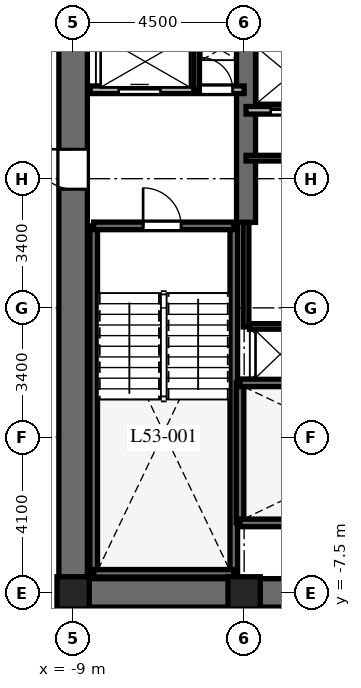
"""IFC4 building model, lengths in metres.
Left out: names, types, materials, properties, quantities, classifications, styles, units other than length and angle.
Written with IfcOpenShell. Run it as: python <this file> out.ifc"""

import sys

from ifc_helpers import new_model, si_unit, direction, frame, frame_2d, origin, origin_2d, place, context, subcontext, project, spatial, rectangle, extrude, element, fill, save


model = new_model("IFC4")
c1 = context("Model", 3, precision=1e-05, world=origin(), true_north=direction((0.0, 1.0)))
c2 = subcontext(c1, "Body", "Model", "MODEL_VIEW")
j1 = project(units=[si_unit("LENGTHUNIT", "METRE"), si_unit("PLANEANGLEUNIT", "RADIAN")], contexts=[c1])
p1 = place(None, origin())
s1 = spatial("IfcSite", under=j1, at=p1, CompositionType="ELEMENT")
p2 = place(p1, origin())
s2 = spatial("IfcBuilding", under=s1, at=p2, CompositionType="ELEMENT")
p3 = place(p2, frame((0.0, 0.0, 214.1)))
s3 = spatial("IfcBuildingStorey", under=s2, at=p3, CompositionType="ELEMENT", Elevation=214.1)
p4 = place(p3, frame((-9.375, -7.5, 0.0), z_axis=(0.0, 0.0, 1.0), x_axis=(1.0, 0.0, 0.0)))
e1 = element("IfcWall", 1, at=p4, inside=s3, PredefinedType="SHEAR", context=c2, shape_type="SweptSolid", body=[
    extrude(rectangle(XDim=18.75, YDim=0.75, at=frame_2d((9.375, 0.0))), origin(), (0.0, 0.0, 1.0), 3.8),
])
p5 = place(p4, frame((9.425, 0.0, 0.0)))
e2 = element("IfcOpeningElement", 2, at=p5, cuts=e1, PredefinedType="OPENING", context=c2, shape_type="SweptSolid", body=[
    extrude(rectangle(XDim=1.0, YDim=2.15, at=frame_2d((0.5, 1.075))), frame((0.0, 0.385, 0.0), z_axis=(0.0, -1.0, 0.0), x_axis=(1.0, 0.0, 0.0)), (0.0, 0.0, 1.0), 0.77),
])
p6 = place(p3, frame((-9.0, -7.125, 0.0), z_axis=(0.0, 0.0, 1.0), x_axis=(0.0, 1.0, 0.0)))
e3 = element("IfcWall", 3, at=p6, inside=s3, PredefinedType="SHEAR", context=c2, shape_type="SweptSolid", body=[
    extrude(rectangle(XDim=14.25, YDim=0.75, at=frame_2d((7.125, 0.0))), origin(), (0.0, 0.0, 1.0), 3.8),
])
p7 = place(p6, frame((10.25, 0.0, 0.0)))
e4 = element("IfcOpeningElement", 4, at=p7, cuts=e3, PredefinedType="OPENING", context=c2, shape_type="SweptSolid", body=[
    extrude(rectangle(XDim=1.05, YDim=2.15, at=frame_2d((0.525, 1.075))), frame((0.0, 0.385, 0.0), z_axis=(0.0, -1.0, 0.0), x_axis=(1.0, 0.0, 0.0)), (0.0, 0.0, 1.0), 0.77),
])
p8 = place(p3, frame((-4.45, 2.25, 0.0), z_axis=(0.0, 0.0, 1.0), x_axis=(0.0, 1.0, 0.0)))
e5 = element("IfcWall", 5, at=p8, inside=s3, PredefinedType="SHEAR", context=c2, shape_type="SweptSolid", body=[
    extrude(rectangle(XDim=4.875, YDim=0.5, at=frame_2d((2.438, 0.0))), origin(), (0.0, 0.0, 1.0), 3.8),
])
for number, where, z_axis, x_axis in (
    (6, (-8.458, -6.985, 0.0), (0.0, 0.0, 1.0), (0.0, 1.0, 0.0)),
    (7, (-4.772, -6.985, 0.0), (0.0, 0.0, 1.0), (0.0, 1.0, 0.0)),
):
    element("IfcWall", number, at=place(p3, frame(where, z_axis=z_axis, x_axis=x_axis)), inside=s3, PredefinedType="SHEAR", context=c2, shape_type="SweptSolid", body=[
        extrude(rectangle(XDim=9.143, YDim=0.2, at=frame_2d((4.572, 0.0))), origin(), (0.0, 0.0, 1.0), 3.8),
    ])
p9 = place(p3, frame((-8.458, -6.985, 0.0), z_axis=(0.0, 0.0, 1.0), x_axis=(1.0, 0.0, 0.0)))
e8 = element("IfcWall", 8, at=p9, inside=s3, PredefinedType="SHEAR", context=c2, shape_type="SweptSolid", body=[
    extrude(rectangle(XDim=3.686, YDim=0.2, at=frame_2d((1.843, 0.0))), origin(), (0.0, 0.0, 1.0), 3.8),
])
p10 = place(p3, frame((-8.458, 2.158, 0.0), z_axis=(0.0, 0.0, 1.0), x_axis=(1.0, 0.0, 0.0)))
e9 = element("IfcWall", 9, at=p10, inside=s3, PredefinedType="SHEAR", context=c2, shape_type="SweptSolid", body=[
    extrude(rectangle(XDim=3.686, YDim=0.2, at=frame_2d((1.843, 0.0))), origin(), (0.0, 0.0, 1.0), 3.8),
])
p11 = place(p10, frame((1.3, 0.0, 0.0)))
e10 = element("IfcOpeningElement", 10, at=p11, cuts=e9, PredefinedType="OPENING", context=c2, shape_type="SweptSolid", body=[
    extrude(rectangle(XDim=1.0, YDim=2.15, at=frame_2d((0.5, 1.075))), frame((0.0, 0.11, 0.0), z_axis=(0.0, -1.0, 0.0), x_axis=(1.0, 0.0, 0.0)), (0.0, 0.0, 1.0), 0.22),
])
p12 = place(p3, frame((-4.608, -5.658, 0.0), z_axis=(0.0, 0.0, 1.0), x_axis=(0.0, 1.0, 0.0)))
e11 = element("IfcWall", 11, at=p12, inside=s3, PredefinedType="SHEAR", context=c2, shape_type="SweptSolid", body=[
    extrude(rectangle(XDim=3.686, YDim=0.2, at=frame_2d((1.843, 0.0))), origin(), (0.0, 0.0, 1.0), 3.8),
])
p13 = place(p3, frame((-4.608, -5.658, 0.0), z_axis=(0.0, 0.0, 1.0), x_axis=(1.0, 0.0, 0.0)))
e12 = element("IfcWall", 12, at=p13, inside=s3, PredefinedType="SHEAR", context=c2, shape_type="SweptSolid", body=[
    extrude(rectangle(XDim=9.166, YDim=0.2, at=frame_2d((4.583, 0.0))), origin(), (0.0, 0.0, 1.0), 3.8),
])
p14 = place(p13, frame((7.45, 0.0, 0.0)))
e13 = element("IfcOpeningElement", 13, at=p14, cuts=e12, PredefinedType="OPENING", context=c2, shape_type="SweptSolid", body=[
    extrude(rectangle(XDim=1.0, YDim=2.15, at=frame_2d((0.5, 1.075))), frame((0.0, 0.11, 0.0), z_axis=(0.0, -1.0, 0.0), x_axis=(1.0, 0.0, 0.0)), (0.0, 0.0, 1.0), 0.22),
])
p15 = place(p3, frame((-4.608, -1.972, 0.0), z_axis=(0.0, 0.0, 1.0), x_axis=(1.0, 0.0, 0.0)))
e14 = element("IfcWall", 14, at=p15, inside=s3, PredefinedType="SHEAR", context=c2, shape_type="SweptSolid", body=[
    extrude(rectangle(XDim=9.166, YDim=0.2, at=frame_2d((4.583, 0.0))), origin(), (0.0, 0.0, 1.0), 3.8),
])
for number, where, z_axis, x_axis in (
    (15, (-9.0, -7.5, 0.0), (0.0, 0.0, 1.0), (1.0, 0.0, 0.0)),
    (16, (-4.5, -7.5, 0.0), (0.0, 0.0, 1.0), (1.0, 0.0, 0.0)),
):
    element("IfcColumn", number, at=place(p3, frame(where, z_axis=z_axis, x_axis=x_axis)), inside=s3, PredefinedType="COLUMN", context=c2, shape_type="SweptSolid", body=[
        extrude(rectangle(XDim=0.85, YDim=0.85, at=origin_2d()), origin(), (0.0, 0.0, 1.0), 3.8),
    ])
p16 = place(p3, frame((-8.55, 5.74, 0.0), z_axis=(0.0, 0.0, 1.0), x_axis=(1.0, 0.0, 0.0)))
e17 = element("IfcWall", 17, at=p16, inside=s3, PredefinedType="PARTITIONING", context=c2, shape_type="SweptSolid", body=[
    extrude(rectangle(XDim=4.05, YDim=0.2, at=frame_2d((2.025, 0.0))), origin(), (0.0, 0.0, 1.0), 3.5),
])
p17 = place(p16, frame((0.75, 0.0, 0.0)))
e18 = element("IfcOpeningElement", 18, at=p17, cuts=e17, PredefinedType="OPENING", context=c2, shape_type="SweptSolid", body=[
    extrude(rectangle(XDim=1.1, YDim=2.2, at=frame_2d((0.55, 1.1))), frame((0.0, 0.11, 0.0), z_axis=(0.0, -1.0, 0.0), x_axis=(1.0, 0.0, 0.0)), (0.0, 0.0, 1.0), 0.22),
])
p18 = place(p16, frame((2.9, 0.0, 0.0)))
e19 = element("IfcOpeningElement", 19, at=p18, cuts=e17, PredefinedType="OPENING", context=c2, shape_type="SweptSolid", body=[
    extrude(rectangle(XDim=0.85, YDim=2.03, at=frame_2d((0.425, 1.015))), frame((0.0, 0.11, 0.0), z_axis=(0.0, -1.0, 0.0), x_axis=(1.0, 0.0, 0.0)), (0.0, 0.0, 1.0), 0.22),
])
p19 = place(p3, frame((-5.75, 5.74, 0.0), z_axis=(0.0, 0.0, 1.0), x_axis=(0.0, 1.0, 0.0)))
e20 = element("IfcWall", 20, at=p19, inside=s3, PredefinedType="PARTITIONING", context=c2, shape_type="SweptSolid", body=[
    extrude(rectangle(XDim=1.41, YDim=0.15, at=frame_2d((0.705, 0.0))), origin(), (0.0, 0.0, 1.0), 3.5),
])
p20 = place(p3, frame((-4.45, 5.2, 0.0), z_axis=(0.0, 0.0, 1.0), x_axis=(1.0, 0.0, 0.0)))
e21 = element("IfcWall", 21, at=p20, inside=s3, PredefinedType="PARTITIONING", context=c2, shape_type="SweptSolid", body=[
    extrude(rectangle(XDim=4.5, YDim=0.2, at=frame_2d((2.25, 0.0))), origin(), (0.0, 0.0, 1.0), 3.5),
])
p21 = place(p20, frame((0.65, 0.0, 0.0)))
e22 = element("IfcOpeningElement", 22, at=p21, cuts=e21, PredefinedType="OPENING", context=c2, shape_type="SweptSolid", body=[
    extrude(rectangle(XDim=1.0, YDim=2.2, at=frame_2d((0.5, 1.1))), frame((0.0, 0.11, 0.0), z_axis=(0.0, -1.0, 0.0), x_axis=(1.0, 0.0, 0.0)), (0.0, 0.0, 1.0), 0.22),
])
p22 = place(p20, frame((2.85, 0.0, 0.0)))
e23 = element("IfcOpeningElement", 23, at=p22, cuts=e21, PredefinedType="OPENING", context=c2, shape_type="SweptSolid", body=[
    extrude(rectangle(XDim=1.0, YDim=2.2, at=frame_2d((0.5, 1.1))), frame((0.0, 0.11, 0.0), z_axis=(0.0, -1.0, 0.0), x_axis=(1.0, 0.0, 0.0)), (0.0, 0.0, 1.0), 0.22),
])
p23 = place(p3, frame((-4.45, -0.5, 0.0), z_axis=(0.0, 0.0, 1.0), x_axis=(0.0, 1.0, 0.0)))
e24 = element("IfcWall", 24, at=p23, inside=s3, PredefinedType="PARTITIONING", context=c2, shape_type="SweptSolid", body=[
    extrude(rectangle(XDim=2.75, YDim=0.15, at=frame_2d((1.375, 0.0))), origin(), (0.0, 0.0, 1.0), 3.5),
])
p24 = place(p3, frame((-4.45, 3.94, 0.0), z_axis=(0.0, 0.0, 1.0), x_axis=(1.0, 0.0, 0.0)))
e25 = element("IfcWall", 25, at=p24, inside=s3, PredefinedType="PARTITIONING", context=c2, shape_type="SweptSolid", body=[
    extrude(rectangle(XDim=2.55, YDim=0.15, at=frame_2d((1.275, 0.0))), origin(), (0.0, 0.0, 1.0), 3.5),
])
p25 = place(p3, frame((-4.36, -0.49, 0.0), z_axis=(0.0, 0.0, 1.0), x_axis=(1.0, 0.0, 0.0)))
e26 = element("IfcWall", 26, at=p25, inside=s3, PredefinedType="PARTITIONING", context=c2, shape_type="SweptSolid", body=[
    extrude(rectangle(XDim=8.72, YDim=0.15, at=frame_2d((4.36, 0.0))), origin(), (0.0, 0.0, 1.0), 3.5),
])
p26 = place(p25, frame((3.16, 0.0, 0.0)))
e27 = element("IfcOpeningElement", 27, at=p26, cuts=e26, PredefinedType="OPENING", context=c2, shape_type="SweptSolid", body=[
    extrude(rectangle(XDim=0.85, YDim=2.03, at=frame_2d((0.425, 1.015))), frame((0.0, 0.085, 0.0), z_axis=(0.0, -1.0, 0.0), x_axis=(1.0, 0.0, 0.0)), (0.0, 0.0, 1.0), 0.17),
])
p27 = place(p25, frame((5.21, 0.0, 0.0)))
e28 = element("IfcOpeningElement", 28, at=p27, cuts=e26, PredefinedType="OPENING", context=c2, shape_type="SweptSolid", body=[
    extrude(rectangle(XDim=0.85, YDim=2.03, at=frame_2d((0.425, 1.015))), frame((0.0, 0.085, 0.0), z_axis=(0.0, -1.0, 0.0), x_axis=(1.0, 0.0, 0.0)), (0.0, 0.0, 1.0), 0.17),
])
p28 = place(p11, origin())
e29 = element("IfcDoor", 29, at=p28, inside=s3, OperationType="SINGLE_SWING_LEFT", PredefinedType="DOOR", context=c2, shape_type="SweptSolid", body=[
    extrude(rectangle(XDim=1.0, YDim=2.15, at=frame_2d((0.5, 1.075))), frame((0.0, 0.025, 0.0), z_axis=(0.0, -1.0, 0.0), x_axis=(1.0, 0.0, 0.0)), (0.0, 0.0, 1.0), 0.05),
])
fill(e10, e29)
p29 = place(p7, origin())
e30 = element("IfcDoor", 30, at=p29, inside=s3, OperationType="SINGLE_SWING_RIGHT", PredefinedType="DOOR", context=c2, shape_type="SweptSolid", body=[
    extrude(rectangle(XDim=1.05, YDim=2.15, at=frame_2d((0.525, 1.075))), frame((0.0, 0.025, 0.0), z_axis=(0.0, -1.0, 0.0), x_axis=(1.0, 0.0, 0.0)), (0.0, 0.0, 1.0), 0.05),
])
fill(e4, e30)
p30 = place(p17, origin())
e31 = element("IfcDoor", 31, at=p30, inside=s3, OperationType="SLIDING_TO_LEFT", PredefinedType="DOOR", context=c2, shape_type="SweptSolid", body=[
    extrude(rectangle(XDim=1.1, YDim=2.2, at=frame_2d((0.55, 1.1))), frame((0.0, 0.025, 0.0), z_axis=(0.0, -1.0, 0.0), x_axis=(1.0, 0.0, 0.0)), (0.0, 0.0, 1.0), 0.05),
])
fill(e18, e31)
p31 = place(p18, origin())
e32 = element("IfcDoor", 32, at=p31, inside=s3, OperationType="SINGLE_SWING_LEFT", PredefinedType="DOOR", context=c2, shape_type="SweptSolid", body=[
    extrude(rectangle(XDim=0.85, YDim=2.03, at=frame_2d((0.425, 1.015))), frame((0.0, 0.025, 0.0), z_axis=(0.0, -1.0, 0.0), x_axis=(1.0, 0.0, 0.0)), (0.0, 0.0, 1.0), 0.05),
])
fill(e19, e32)
p32 = place(p21, origin())
e33 = element("IfcDoor", 33, at=p32, inside=s3, OperationType="SLIDING_TO_LEFT", PredefinedType="DOOR", context=c2, shape_type="SweptSolid", body=[
    extrude(rectangle(XDim=1.0, YDim=2.2, at=frame_2d((0.5, 1.1))), frame((0.0, 0.025, 0.0), z_axis=(0.0, -1.0, 0.0), x_axis=(1.0, 0.0, 0.0)), (0.0, 0.0, 1.0), 0.05),
])
fill(e22, e33)
save(model, sys.argv[1])
